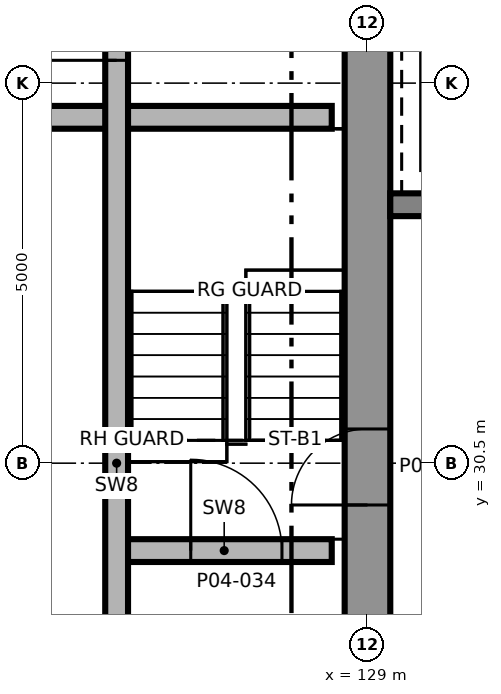
"""IFC4 building model, lengths in metres.
Left out: names, types, materials, properties, quantities, classifications, styles, units other than length and angle.
Written with IfcOpenShell. Run it as: python <this file> out.ifc"""

import sys

from ifc_helpers import new_model, si_unit, direction, frame, frame_2d, origin, place, context, subcontext, project, spatial, rectangle, extrude, element, fill, save


model = new_model("IFC4")
c1 = context("Model", 3, precision=1e-05, world=origin(), true_north=direction((0.0, 1.0)))
c2 = subcontext(c1, "Body", "Model", "MODEL_VIEW")
j1 = project(units=[si_unit("LENGTHUNIT", "METRE"), si_unit("PLANEANGLEUNIT", "RADIAN")], contexts=[c1])
p1 = place(None, origin())
s1 = spatial("IfcSite", under=j1, at=p1, CompositionType="ELEMENT")
p2 = place(p1, origin())
s2 = spatial("IfcBuilding", under=s1, at=p2, CompositionType="ELEMENT")
p3 = place(p2, frame((0.0, 0.0, 23.5)))
s3 = spatial("IfcBuildingStorey", under=s2, at=p3, CompositionType="ELEMENT", Elevation=23.5)
p4 = place(p3, frame((129.0, 24.8, 0.0), z_axis=(0.0, 0.0, 1.0), x_axis=(0.0, 1.0, 0.0)))
e1 = element("IfcWall", 1, at=p4, inside=s3, PredefinedType="SHEAR", context=c2, shape_type="SweptSolid", body=[
    extrude(rectangle(XDim=12.4, YDim=0.6, at=frame_2d((6.2, 0.0))), origin(), (0.0, 0.0, 1.0), 5.0),
])
p5 = place(p4, frame((5.15, 0.0, 0.0)))
e2 = element("IfcOpeningElement", 2, at=p5, cuts=e1, PredefinedType="OPENING", context=c2, shape_type="SweptSolid", body=[
    extrude(rectangle(XDim=1.0, YDim=2.1, at=frame_2d((0.5, 1.05))), frame((0.0, 0.31, 0.0), z_axis=(0.0, -1.0, 0.0), x_axis=(1.0, 0.0, 0.0)), (0.0, 0.0, 1.0), 0.62),
])
p6 = place(p3, frame((129.3, 33.9, 0.0), z_axis=(0.0, 0.0, 1.0), x_axis=(1.0, 0.0, 0.0)))
e3 = element("IfcWall", 3, at=p6, inside=s3, PredefinedType="SHEAR", context=c2, shape_type="SweptSolid", body=[
    extrude(rectangle(XDim=2.65, YDim=0.3, at=frame_2d((1.325, 0.0))), origin(), (0.0, 0.0, 1.0), 5.0),
])
p7 = place(p6, frame((1.05, 0.0, 0.0)))
e4 = element("IfcOpeningElement", 4, at=p7, cuts=e3, PredefinedType="OPENING", context=c2, shape_type="SweptSolid", body=[
    extrude(rectangle(XDim=1.3, YDim=2.4, at=frame_2d((0.65, 1.2))), frame((0.0, 0.16, 0.0), z_axis=(0.0, -1.0, 0.0), x_axis=(1.0, 0.0, 0.0)), (0.0, 0.0, 1.0), 0.32),
])
p8 = place(p3, frame((125.7, 29.35, 0.0), z_axis=(0.0, 0.0, 1.0), x_axis=(1.0, 0.0, 0.0)))
e5 = element("IfcWall", 5, at=p8, inside=s3, PredefinedType="SHEAR", context=c2, shape_type="SweptSolid", body=[
    extrude(rectangle(XDim=2.83, YDim=0.3, at=frame_2d((1.415, 0.0))), origin(), (0.0, 0.0, 1.0), 4.7),
])
p9 = place(p8, frame((0.975, 0.0, 0.0)))
e6 = element("IfcOpeningElement", 6, at=p9, cuts=e5, PredefinedType="OPENING", context=c2, shape_type="SweptSolid", body=[
    extrude(rectangle(XDim=1.2, YDim=2.1, at=frame_2d((0.6, 1.05))), frame((0.0, 0.16, 0.0), z_axis=(0.0, -1.0, 0.0), x_axis=(1.0, 0.0, 0.0)), (0.0, 0.0, 1.0), 0.32),
])
p10 = place(p3, frame((114.6, 35.05, 0.0), z_axis=(0.0, 0.0, 1.0), x_axis=(1.0, 0.0, 0.0)))
e7 = element("IfcWall", 7, at=p10, inside=s3, PredefinedType="SHEAR", context=c2, shape_type="SweptSolid", body=[
    extrude(rectangle(XDim=13.93, YDim=0.3, at=frame_2d((6.965, 0.0))), origin(), (0.0, 0.0, 1.0), 4.7),
])
p11 = place(p10, frame((4.83, 0.0, 0.0)))
e8 = element("IfcOpeningElement", 8, at=p11, cuts=e7, PredefinedType="OPENING", context=c2, shape_type="SweptSolid", body=[
    extrude(rectangle(XDim=1.6, YDim=2.1, at=frame_2d((0.8, 1.05))), frame((0.0, 0.16, 0.0), z_axis=(0.0, -1.0, 0.0), x_axis=(1.0, 0.0, 0.0)), (0.0, 0.0, 1.0), 0.32),
])
p12 = place(p3, frame((125.7, 11.07, 0.0), z_axis=(0.0, 0.0, 1.0), x_axis=(0.0, 1.0, 0.0)))
e9 = element("IfcWall", 9, at=p12, inside=s3, PredefinedType="SHEAR", context=c2, shape_type="SweptSolid", body=[
    extrude(rectangle(XDim=38.86, YDim=0.3, at=frame_2d((19.43, 0.0))), origin(), (0.0, 0.0, 1.0), 4.7),
])
p13 = place(p12, frame((24.73, 0.0, 0.0)))
e10 = element("IfcOpeningElement", 10, at=p13, cuts=e9, PredefinedType="OPENING", context=c2, shape_type="SweptSolid", body=[
    extrude(rectangle(XDim=1.2, YDim=2.1, at=frame_2d((0.6, 1.05))), frame((0.0, 0.16, 0.0), z_axis=(0.0, -1.0, 0.0), x_axis=(1.0, 0.0, 0.0)), (0.0, 0.0, 1.0), 0.32),
])
p14 = place(p9, origin())
e11 = element("IfcDoor", 11, at=p14, inside=s3, OperationType="SINGLE_SWING_RIGHT", PredefinedType="DOOR", context=c2, shape_type="SweptSolid", body=[
    extrude(rectangle(XDim=1.2, YDim=2.1, at=frame_2d((0.6, 1.05))), frame((0.0, 0.025, 0.0), z_axis=(0.0, -1.0, 0.0), x_axis=(1.0, 0.0, 0.0)), (0.0, 0.0, 1.0), 0.05),
])
fill(e6, e11)
p15 = place(p13, origin())
e12 = element("IfcDoor", 12, at=p15, inside=s3, OperationType="SINGLE_SWING_LEFT", PredefinedType="DOOR", context=c2, shape_type="SweptSolid", body=[
    extrude(rectangle(XDim=1.2, YDim=2.1, at=frame_2d((0.6, 1.05))), frame((0.0, 0.025, 0.0), z_axis=(0.0, -1.0, 0.0), x_axis=(1.0, 0.0, 0.0)), (0.0, 0.0, 1.0), 0.05),
])
fill(e10, e12)
p16 = place(p5, origin())
e13 = element("IfcDoor", 13, at=p16, inside=s3, OperationType="SINGLE_SWING_RIGHT", PredefinedType="DOOR", context=c2, shape_type="SweptSolid", body=[
    extrude(rectangle(XDim=1.0, YDim=2.1, at=frame_2d((0.5, 1.05))), frame((0.0, 0.025, 0.0), z_axis=(0.0, -1.0, 0.0), x_axis=(1.0, 0.0, 0.0)), (0.0, 0.0, 1.0), 0.05),
])
fill(e2, e13)
save(model, sys.argv[1])
